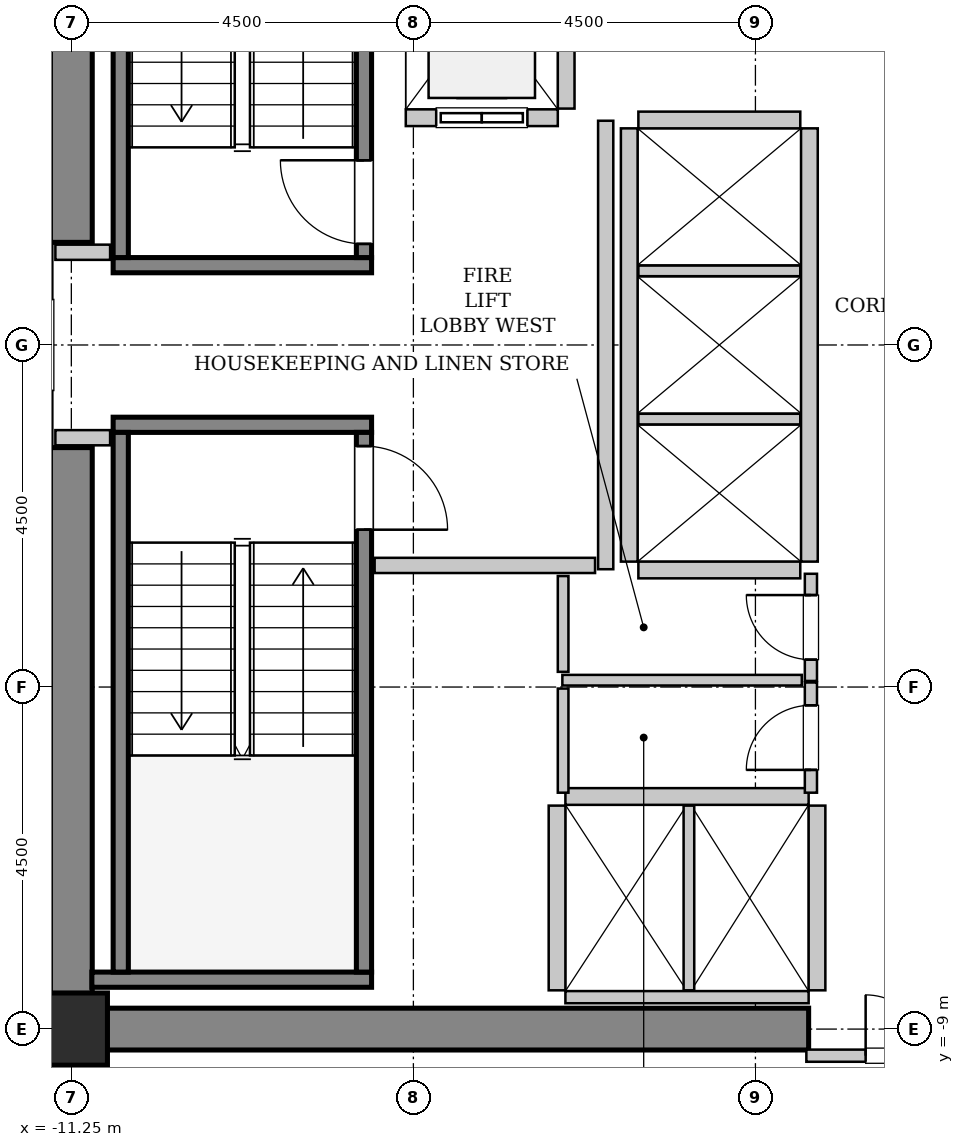
"""IFC4 building model, lengths in metres.
Left out: names, types, materials, properties, quantities, classifications, styles, units other than length and angle.
Written with IfcOpenShell. Run it as: python <this file> out.ifc"""

import sys

from ifc_helpers import new_model, si_unit, direction, frame, frame_2d, origin, origin_2d, place, context, subcontext, project, spatial, rectangle, hollow_rectangle, extrude, source, transform, mapped, element, fill, save


model = new_model("IFC4")
c1 = context("Model", 3, precision=1e-05, world=origin(), true_north=direction((0.0, 1.0)))
c2 = subcontext(c1, "Body", "Model", "MODEL_VIEW")
j1 = project(units=[si_unit("LENGTHUNIT", "METRE"), si_unit("PLANEANGLEUNIT", "RADIAN")], contexts=[c1])
p1 = place(None, origin())
s1 = spatial("IfcSite", under=j1, at=p1, CompositionType="ELEMENT")
p2 = place(p1, origin())
s2 = spatial("IfcBuilding", under=s1, at=p2, CompositionType="ELEMENT")
p3 = place(p2, frame((0.0, 0.0, 109.8)))
s3 = spatial("IfcBuildingStorey", under=s2, at=p3, CompositionType="ELEMENT", Elevation=109.8)
m1 = source(origin(), c2, "Body", "SweptSolid", [
    extrude(rectangle(XDim=9.975, YDim=0.55, at=frame_2d((4.987, 0.0))), origin(), (0.0, 0.0, 1.0), 3.8),
])
p4 = place(p3, frame((-11.525, -9.0, 0.0), z_axis=(0.0, 0.0, 1.0), x_axis=(1.0, 0.0, 0.0)))
e1 = element("IfcWall", 1, at=p4, inside=s3, PredefinedType="SHEAR", context=c2, shape_type="MappedRepresentation", body=[
    mapped(m1, transform((0.0, 0.0, 0.0), x_axis=(1.0, 0.0, 0.0), y_axis=(0.0, 1.0, 0.0), z_axis=(0.0, 0.0, 1.0), scale=1.0)),
])
m2 = source(origin(), c2, "Body", "SweptSolid", [
    extrude(rectangle(XDim=7.375, YDim=0.55, at=frame_2d((3.688, 0.0))), origin(), (0.0, 0.0, 1.0), 3.8),
])
for number, where, z_axis, x_axis in (
    (2, (-11.25, -8.725, 0.0), (0.0, 0.0, 1.0), (0.0, 1.0, 0.0)),
    (3, (-11.25, 1.35, 0.0), (0.0, 0.0, 1.0), (0.0, 1.0, 0.0)),
):
    element("IfcWall", number, at=place(p3, frame(where, z_axis=z_axis, x_axis=x_axis)), inside=s3, PredefinedType="SHEAR", context=c2, shape_type="MappedRepresentation", body=[
        mapped(m2, transform((0.0, 0.0, 0.0), x_axis=(1.0, 0.0, 0.0), y_axis=(0.0, 1.0, 0.0), z_axis=(0.0, 0.0, 1.0), scale=1.0)),
    ])
m3 = source(origin(), c2, "Body", "SweptSolid", [
    extrude(hollow_rectangle(XDim=0.95, YDim=0.95, WallThickness=0.045, InnerFilletRadius=0.045, OuterFilletRadius=0.09, at=origin_2d()), origin(), (0.0, 0.0, 1.0), 3.8),
])
p5 = place(p3, frame((-11.25, -9.0, 0.0), z_axis=(0.0, 0.0, 1.0), x_axis=(1.0, 0.0, 0.0)))
e4 = element("IfcColumn", 4, at=p5, inside=s3, PredefinedType="COLUMN", context=c2, shape_type="MappedRepresentation", body=[
    mapped(m3, transform((0.0, 0.0, 0.0), x_axis=(1.0, 0.0, 0.0), y_axis=(0.0, 1.0, 0.0), z_axis=(0.0, 0.0, 1.0), scale=1.0)),
])
m4 = source(origin(), c2, "Body", "SweptSolid", [
    extrude(rectangle(XDim=3.4, YDim=0.2, at=frame_2d((1.7, 0.0))), origin(), (0.0, 0.0, 1.0), 3.8),
])
p6 = place(p3, frame((-7.3, 1.05, 0.0), z_axis=(0.0, 0.0, 1.0), x_axis=(-1.0, 0.0, 0.0)))
e5 = element("IfcWall", 5, at=p6, inside=s3, PredefinedType="SOLIDWALL", context=c2, shape_type="MappedRepresentation", body=[
    mapped(m4, transform((0.0, 0.0, 0.0), x_axis=(1.0, 0.0, 0.0), y_axis=(0.0, 1.0, 0.0), z_axis=(0.0, 0.0, 1.0), scale=1.0)),
])
m5 = source(origin(), c2, "Body", "SweptSolid", [
    extrude(rectangle(XDim=7.1, YDim=0.2, at=frame_2d((3.55, 0.0))), origin(), (0.0, 0.0, 1.0), 3.8),
])
p7 = place(p3, frame((-7.4, 1.15, 0.0), z_axis=(0.0, 0.0, 1.0), x_axis=(0.0, 1.0, 0.0)))
e6 = element("IfcWall", 6, at=p7, inside=s3, PredefinedType="SOLIDWALL", context=c2, shape_type="MappedRepresentation", body=[
    mapped(m5, transform((0.0, 0.0, 0.0), x_axis=(1.0, 0.0, 0.0), y_axis=(0.0, 1.0, 0.0), z_axis=(0.0, 0.0, 1.0), scale=1.0)),
])
p8 = place(p7, frame((0.18, 0.0, 0.0)))
e7 = element("IfcOpeningElement", 7, at=p8, cuts=e6, PredefinedType="OPENING", context=c2, shape_type="SweptSolid", body=[
    extrude(rectangle(XDim=1.1, YDim=2.15, at=frame_2d((0.55, 1.075))), frame((0.0, 0.11, 0.0), z_axis=(0.0, -1.0, 0.0), x_axis=(1.0, 0.0, 0.0)), (0.0, 0.0, 1.0), 0.22),
])
p9 = place(p3, frame((-10.6, 1.15, 0.0), z_axis=(0.0, 0.0, 1.0), x_axis=(0.0, 1.0, 0.0)))
e8 = element("IfcWall", 8, at=p9, inside=s3, PredefinedType="SOLIDWALL", context=c2, shape_type="MappedRepresentation", body=[
    mapped(m5, transform((0.0, 0.0, 0.0), x_axis=(1.0, 0.0, 0.0), y_axis=(0.0, 1.0, 0.0), z_axis=(0.0, 0.0, 1.0), scale=1.0)),
])
p10 = place(p3, frame((-10.7, -1.05, 0.0), z_axis=(0.0, 0.0, 1.0), x_axis=(1.0, 0.0, 0.0)))
e9 = element("IfcWall", 9, at=p10, inside=s3, PredefinedType="SOLIDWALL", context=c2, shape_type="MappedRepresentation", body=[
    mapped(m4, transform((0.0, 0.0, 0.0), x_axis=(1.0, 0.0, 0.0), y_axis=(0.0, 1.0, 0.0), z_axis=(0.0, 0.0, 1.0), scale=1.0)),
])
m6 = source(origin(), c2, "Body", "SweptSolid", [
    extrude(rectangle(XDim=3.68, YDim=0.2, at=frame_2d((1.84, 0.0))), origin(), (0.0, 0.0, 1.0), 3.8),
])
p11 = place(p3, frame((-10.98, -8.35, 0.0), z_axis=(0.0, 0.0, 1.0), x_axis=(1.0, 0.0, 0.0)))
e10 = element("IfcWall", 10, at=p11, inside=s3, PredefinedType="SOLIDWALL", context=c2, shape_type="MappedRepresentation", body=[
    mapped(m6, transform((0.0, 0.0, 0.0), x_axis=(1.0, 0.0, 0.0), y_axis=(0.0, 1.0, 0.0), z_axis=(0.0, 0.0, 1.0), scale=1.0)),
])
p12 = place(p3, frame((-10.6, -1.15, 0.0), z_axis=(0.0, 0.0, 1.0), x_axis=(0.0, -1.0, 0.0)))
e11 = element("IfcWall", 11, at=p12, inside=s3, PredefinedType="SOLIDWALL", context=c2, shape_type="MappedRepresentation", body=[
    mapped(m5, transform((0.0, 0.0, 0.0), x_axis=(1.0, 0.0, 0.0), y_axis=(0.0, 1.0, 0.0), z_axis=(0.0, 0.0, 1.0), scale=1.0)),
])
p13 = place(p3, frame((-7.4, -1.15, 0.0), z_axis=(0.0, 0.0, 1.0), x_axis=(0.0, -1.0, 0.0)))
e12 = element("IfcWall", 12, at=p13, inside=s3, PredefinedType="SOLIDWALL", context=c2, shape_type="MappedRepresentation", body=[
    mapped(m5, transform((0.0, 0.0, 0.0), x_axis=(1.0, 0.0, 0.0), y_axis=(0.0, 1.0, 0.0), z_axis=(0.0, 0.0, 1.0), scale=1.0)),
])
p14 = place(p13, frame((0.18, 0.0, 0.0)))
e13 = element("IfcOpeningElement", 13, at=p14, cuts=e12, PredefinedType="OPENING", context=c2, shape_type="SweptSolid", body=[
    extrude(rectangle(XDim=1.1, YDim=2.15, at=frame_2d((0.55, 1.075))), frame((0.0, 0.11, 0.0), z_axis=(0.0, -1.0, 0.0), x_axis=(1.0, 0.0, 0.0)), (0.0, 0.0, 1.0), 0.22),
])
m7 = source(origin(), c2, "Body", "SweptSolid", [
    extrude(rectangle(XDim=2.0, YDim=0.22, at=frame_2d((1.0, 0.0))), origin(), (0.0, 0.0, 1.0), 3.535),
])
p15 = place(p3, frame((-6.85, 2.99, 0.0), z_axis=(0.0, 0.0, 1.0), x_axis=(1.0, 0.0, 0.0)))
e14 = element("IfcWall", 14, at=p15, inside=s3, PredefinedType="SOLIDWALL", context=c2, shape_type="MappedRepresentation", body=[
    mapped(m7, transform((0.0, 0.0, 0.0), x_axis=(1.0, 0.0, 0.0), y_axis=(0.0, 1.0, 0.0), z_axis=(0.0, 0.0, 1.0), scale=1.0)),
])
p16 = place(p15, frame((0.4, 0.0, 0.0)))
e15 = element("IfcOpeningElement", 15, at=p16, cuts=e14, PredefinedType="OPENING", context=c2, shape_type="SweptSolid", body=[
    extrude(rectangle(XDim=1.2, YDim=2.2, at=frame_2d((0.6, 1.1))), frame((0.0, 0.12, 0.0), z_axis=(0.0, -1.0, 0.0), x_axis=(1.0, 0.0, 0.0)), (0.0, 0.0, 1.0), 0.24),
])
m8 = source(origin(), c2, "Body", "SweptSolid", [
    extrude(rectangle(XDim=2.68, YDim=0.22, at=frame_2d((1.34, 0.0))), origin(), (0.0, 0.0, 1.0), 3.535),
])
p17 = place(p3, frame((-4.74, 3.11, 0.0), z_axis=(0.0, 0.0, 1.0), x_axis=(0.0, 1.0, 0.0)))
e16 = element("IfcWall", 16, at=p17, inside=s3, PredefinedType="SOLIDWALL", context=c2, shape_type="MappedRepresentation", body=[
    mapped(m8, transform((0.0, 0.0, 0.0), x_axis=(1.0, 0.0, 0.0), y_axis=(0.0, 1.0, 0.0), z_axis=(0.0, 0.0, 1.0), scale=1.0)),
])
m9 = source(origin(), c2, "Body", "SweptSolid", [
    extrude(rectangle(XDim=3.2, YDim=0.22, at=frame_2d((1.6, 0.0))), origin(), (0.0, 0.0, 1.0), 3.535),
])
p18 = place(p3, frame((-1.55, -5.94, 0.0), z_axis=(0.0, 0.0, 1.0), x_axis=(-1.0, 0.0, 0.0)))
e17 = element("IfcWall", 17, at=p18, inside=s3, PredefinedType="SOLIDWALL", context=c2, shape_type="MappedRepresentation", body=[
    mapped(m9, transform((0.0, 0.0, 0.0), x_axis=(1.0, 0.0, 0.0), y_axis=(0.0, 1.0, 0.0), z_axis=(0.0, 0.0, 1.0), scale=1.0)),
])
m10 = source(origin(), c2, "Body", "SweptSolid", [
    extrude(rectangle(XDim=3.2, YDim=0.16, at=frame_2d((1.6, 0.0))), origin(), (0.0, 0.0, 1.0), 2.425),
])
p19 = place(p3, frame((-4.75, -8.58, 0.0), z_axis=(0.0, 0.0, 1.0), x_axis=(1.0, 0.0, 0.0)))
e18 = element("IfcWall", 18, at=p19, inside=s3, PredefinedType="PARTITIONING", context=c2, shape_type="MappedRepresentation", body=[
    mapped(m10, transform((0.0, 0.0, 0.0), x_axis=(1.0, 0.0, 0.0), y_axis=(0.0, 1.0, 0.0), z_axis=(0.0, 0.0, 1.0), scale=1.0)),
])
m11 = source(origin(), c2, "Body", "SweptSolid", [
    extrude(rectangle(XDim=2.43, YDim=0.22, at=frame_2d((1.215, 0.0))), origin(), (0.0, 0.0, 1.0), 3.535),
])
p20 = place(p3, frame((-4.86, -6.06, 0.0), z_axis=(0.0, 0.0, 1.0), x_axis=(0.0, -1.0, 0.0)))
e19 = element("IfcWall", 19, at=p20, inside=s3, PredefinedType="SOLIDWALL", context=c2, shape_type="MappedRepresentation", body=[
    mapped(m11, transform((0.0, 0.0, 0.0), x_axis=(1.0, 0.0, 0.0), y_axis=(0.0, 1.0, 0.0), z_axis=(0.0, 0.0, 1.0), scale=1.0)),
])
m12 = source(origin(), c2, "Body", "SweptSolid", [
    extrude(rectangle(XDim=2.43, YDim=0.14, at=frame_2d((1.215, 0.0))), origin(), (0.0, 0.0, 1.0), 3.535),
])
p21 = place(p3, frame((-3.125, -8.49, 0.0), z_axis=(0.0, 0.0, 1.0), x_axis=(0.0, 1.0, 0.0)))
e20 = element("IfcWall", 20, at=p21, inside=s3, PredefinedType="PARTITIONING", context=c2, shape_type="MappedRepresentation", body=[
    mapped(m12, transform((0.0, 0.0, 0.0), x_axis=(1.0, 0.0, 0.0), y_axis=(0.0, 1.0, 0.0), z_axis=(0.0, 0.0, 1.0), scale=1.0)),
])
p22 = place(p3, frame((-1.44, -8.49, 0.0), z_axis=(0.0, 0.0, 1.0), x_axis=(0.0, 1.0, 0.0)))
e21 = element("IfcWall", 21, at=p22, inside=s3, PredefinedType="SOLIDWALL", context=c2, shape_type="MappedRepresentation", body=[
    mapped(m11, transform((0.0, 0.0, 0.0), x_axis=(1.0, 0.0, 0.0), y_axis=(0.0, 1.0, 0.0), z_axis=(0.0, 0.0, 1.0), scale=1.0)),
])
m13 = source(origin(), c2, "Body", "SweptSolid", [
    extrude(rectangle(XDim=5.7, YDim=0.22, at=frame_2d((2.85, 0.0))), origin(), (0.0, 0.0, 1.0), 3.535),
])
for number, where, z_axis, x_axis in (
    (22, (-1.54, -2.85, 0.0), (0.0, 0.0, 1.0), (0.0, 1.0, 0.0)),
    (23, (-3.91, 2.85, 0.0), (0.0, 0.0, 1.0), (0.0, -1.0, 0.0)),
):
    element("IfcWall", number, at=place(p3, frame(where, z_axis=z_axis, x_axis=x_axis)), inside=s3, PredefinedType="SOLIDWALL", context=c2, shape_type="MappedRepresentation", body=[
        mapped(m13, transform((0.0, 0.0, 0.0), x_axis=(1.0, 0.0, 0.0), y_axis=(0.0, 1.0, 0.0), z_axis=(0.0, 0.0, 1.0), scale=1.0)),
    ])
m14 = source(origin(), c2, "Body", "SweptSolid", [
    extrude(rectangle(XDim=2.13, YDim=0.22, at=frame_2d((1.065, 0.0))), origin(), (0.0, 0.0, 1.0), 3.535),
])
p23 = place(p3, frame((-3.79, -2.96, 0.0), z_axis=(0.0, 0.0, 1.0), x_axis=(1.0, 0.0, 0.0)))
e24 = element("IfcWall", 24, at=p23, inside=s3, PredefinedType="SOLIDWALL", context=c2, shape_type="MappedRepresentation", body=[
    mapped(m14, transform((0.0, 0.0, 0.0), x_axis=(1.0, 0.0, 0.0), y_axis=(0.0, 1.0, 0.0), z_axis=(0.0, 0.0, 1.0), scale=1.0)),
])
m15 = source(origin(), c2, "Body", "SweptSolid", [
    extrude(rectangle(XDim=2.13, YDim=0.14, at=frame_2d((1.065, 0.0))), origin(), (0.0, 0.0, 1.0), 3.535),
])
for number, where, z_axis, x_axis in (
    (25, (-3.79, -0.975, 0.0), (0.0, 0.0, 1.0), (1.0, 0.0, 0.0)),
    (26, (-3.79, 0.975, 0.0), (0.0, 0.0, 1.0), (1.0, 0.0, 0.0)),
):
    element("IfcWall", number, at=place(p3, frame(where, z_axis=z_axis, x_axis=x_axis)), inside=s3, PredefinedType="PARTITIONING", context=c2, shape_type="MappedRepresentation", body=[
        mapped(m15, transform((0.0, 0.0, 0.0), x_axis=(1.0, 0.0, 0.0), y_axis=(0.0, 1.0, 0.0), z_axis=(0.0, 0.0, 1.0), scale=1.0)),
    ])
p24 = place(p3, frame((-1.66, 2.96, 0.0), z_axis=(0.0, 0.0, 1.0), x_axis=(-1.0, 0.0, 0.0)))
e27 = element("IfcWall", 27, at=p24, inside=s3, PredefinedType="SOLIDWALL", context=c2, shape_type="MappedRepresentation", body=[
    mapped(m14, transform((0.0, 0.0, 0.0), x_axis=(1.0, 0.0, 0.0), y_axis=(0.0, 1.0, 0.0), z_axis=(0.0, 0.0, 1.0), scale=1.0)),
])
m16 = source(origin(), c2, "Body", "SweptSolid", [
    extrude(rectangle(XDim=5.9, YDim=0.2, at=frame_2d((2.95, 0.0))), origin(), (0.0, 0.0, 1.0), 3.535),
])
p25 = place(p3, frame((-4.22, -2.95, 0.0), z_axis=(0.0, 0.0, 1.0), x_axis=(0.0, 1.0, 0.0)))
e28 = element("IfcWall", 28, at=p25, inside=s3, PredefinedType="PARTITIONING", context=c2, shape_type="MappedRepresentation", body=[
    mapped(m16, transform((0.0, 0.0, 0.0), x_axis=(1.0, 0.0, 0.0), y_axis=(0.0, 1.0, 0.0), z_axis=(0.0, 0.0, 1.0), scale=1.0)),
])
m17 = source(origin(), c2, "Body", "SweptSolid", [
    extrude(rectangle(XDim=2.9, YDim=0.2, at=frame_2d((1.45, 0.0))), origin(), (0.0, 0.0, 1.0), 3.535),
])
p26 = place(p3, frame((-7.26, -2.9, 0.0), z_axis=(0.0, 0.0, 1.0), x_axis=(1.0, 0.0, 0.0)))
e29 = element("IfcWall", 29, at=p26, inside=s3, PredefinedType="PARTITIONING", context=c2, shape_type="MappedRepresentation", body=[
    mapped(m17, transform((0.0, 0.0, 0.0), x_axis=(1.0, 0.0, 0.0), y_axis=(0.0, 1.0, 0.0), z_axis=(0.0, 0.0, 1.0), scale=1.0)),
])
m18 = source(origin(), c2, "Body", "SweptSolid", [
    extrude(rectangle(XDim=0.72, YDim=0.2, at=frame_2d((0.36, 0.0))), origin(), (0.0, 0.0, 1.0), 3.535),
])
for number, where, z_axis, x_axis in (
    (30, (-11.46, 1.22, 0.0), (0.0, 0.0, 1.0), (1.0, 0.0, 0.0)),
    (31, (-11.46, -1.22, 0.0), (0.0, 0.0, 1.0), (1.0, 0.0, 0.0)),
):
    element("IfcWall", number, at=place(p3, frame(where, z_axis=z_axis, x_axis=x_axis)), inside=s3, PredefinedType="PARTITIONING", context=c2, shape_type="MappedRepresentation", body=[
        mapped(m18, transform((0.0, 0.0, 0.0), x_axis=(1.0, 0.0, 0.0), y_axis=(0.0, 1.0, 0.0), z_axis=(0.0, 0.0, 1.0), scale=1.0)),
    ])
m19 = source(origin(), c2, "Body", "SweptSolid", [
    extrude(rectangle(XDim=3.16, YDim=0.16, at=frame_2d((1.58, 0.0))), origin(), (0.0, 0.0, 1.0), 2.425),
])
p27 = place(p3, frame((-1.58, -9.35, 0.0), z_axis=(0.0, 0.0, 1.0), x_axis=(1.0, 0.0, 0.0)))
e32 = element("IfcWall", 32, at=p27, inside=s3, PredefinedType="PARTITIONING", context=c2, shape_type="MappedRepresentation", body=[
    mapped(m19, transform((0.0, 0.0, 0.0), x_axis=(1.0, 0.0, 0.0), y_axis=(0.0, 1.0, 0.0), z_axis=(0.0, 0.0, 1.0), scale=1.0)),
])
p28 = place(p27, frame((0.78, 0.0, 0.0)))
e33 = element("IfcOpeningElement", 33, at=p28, cuts=e32, PredefinedType="OPENING", context=c2, shape_type="SweptSolid", body=[
    extrude(rectangle(XDim=1.6, YDim=2.3, at=frame_2d((0.8, 1.15))), frame((0.0, 0.09, 0.0), z_axis=(0.0, -1.0, 0.0), x_axis=(1.0, 0.0, 0.0)), (0.0, 0.0, 1.0), 0.18),
])
m20 = source(origin(), c2, "Body", "SweptSolid", [
    extrude(rectangle(XDim=1.41, YDim=0.16, at=frame_2d((0.705, 0.0))), origin(), (0.0, 0.0, 1.0), 3.535),
])
p29 = place(p3, frame((-1.52, -4.42, 0.0), z_axis=(0.0, 0.0, 1.0), x_axis=(0.0, 1.0, 0.0)))
e34 = element("IfcWall", 34, at=p29, inside=s3, PredefinedType="PARTITIONING", context=c2, shape_type="MappedRepresentation", body=[
    mapped(m20, transform((0.0, 0.0, 0.0), x_axis=(1.0, 0.0, 0.0), y_axis=(0.0, 1.0, 0.0), z_axis=(0.0, 0.0, 1.0), scale=1.0)),
])
p30 = place(p29, frame((0.28, 0.0, 0.0)))
e35 = element("IfcOpeningElement", 35, at=p30, cuts=e34, PredefinedType="OPENING", context=c2, shape_type="SweptSolid", body=[
    extrude(rectangle(XDim=0.85, YDim=2.1, at=frame_2d((0.425, 1.05))), frame((0.0, 0.09, 0.0), z_axis=(0.0, -1.0, 0.0), x_axis=(1.0, 0.0, 0.0)), (0.0, 0.0, 1.0), 0.18),
])
m21 = source(origin(), c2, "Body", "SweptSolid", [
    extrude(rectangle(XDim=3.15, YDim=0.14, at=frame_2d((1.575, 0.0))), origin(), (0.0, 0.0, 1.0), 3.535),
])
p31 = place(p3, frame((-4.79, -4.41, 0.0), z_axis=(0.0, 0.0, 1.0), x_axis=(1.0, 0.0, 0.0)))
e36 = element("IfcWall", 36, at=p31, inside=s3, PredefinedType="PARTITIONING", context=c2, shape_type="MappedRepresentation", body=[
    mapped(m21, transform((0.0, 0.0, 0.0), x_axis=(1.0, 0.0, 0.0), y_axis=(0.0, 1.0, 0.0), z_axis=(0.0, 0.0, 1.0), scale=1.0)),
])
m22 = source(origin(), c2, "Body", "SweptSolid", [
    extrude(rectangle(XDim=1.26, YDim=0.14, at=frame_2d((0.63, 0.0))), origin(), (0.0, 0.0, 1.0), 3.535),
])
p32 = place(p3, frame((-4.78, -4.3, 0.0), z_axis=(0.0, 0.0, 1.0), x_axis=(0.0, 1.0, 0.0)))
e37 = element("IfcWall", 37, at=p32, inside=s3, PredefinedType="PARTITIONING", context=c2, shape_type="MappedRepresentation", body=[
    mapped(m22, transform((0.0, 0.0, 0.0), x_axis=(1.0, 0.0, 0.0), y_axis=(0.0, 1.0, 0.0), z_axis=(0.0, 0.0, 1.0), scale=1.0)),
])
m23 = source(origin(), c2, "Body", "SweptSolid", [
    extrude(rectangle(XDim=1.45, YDim=0.16, at=frame_2d((0.725, 0.0))), origin(), (0.0, 0.0, 1.0), 3.535),
])
p33 = place(p3, frame((-1.52, -5.89, 0.0), z_axis=(0.0, 0.0, 1.0), x_axis=(0.0, 1.0, 0.0)))
e38 = element("IfcWall", 38, at=p33, inside=s3, PredefinedType="PARTITIONING", context=c2, shape_type="MappedRepresentation", body=[
    mapped(m23, transform((0.0, 0.0, 0.0), x_axis=(1.0, 0.0, 0.0), y_axis=(0.0, 1.0, 0.0), z_axis=(0.0, 0.0, 1.0), scale=1.0)),
])
p34 = place(p33, frame((0.3, 0.0, 0.0)))
e39 = element("IfcOpeningElement", 39, at=p34, cuts=e38, PredefinedType="OPENING", context=c2, shape_type="SweptSolid", body=[
    extrude(rectangle(XDim=0.85, YDim=2.1, at=frame_2d((0.425, 1.05))), frame((0.0, 0.09, 0.0), z_axis=(0.0, -1.0, 0.0), x_axis=(1.0, 0.0, 0.0)), (0.0, 0.0, 1.0), 0.18),
])
m24 = source(origin(), c2, "Body", "SweptSolid", [
    extrude(rectangle(XDim=1.37, YDim=0.14, at=frame_2d((0.685, 0.0))), origin(), (0.0, 0.0, 1.0), 3.535),
])
p35 = place(p3, frame((-4.78, -5.89, 0.0), z_axis=(0.0, 0.0, 1.0), x_axis=(0.0, 1.0, 0.0)))
e40 = element("IfcWall", 40, at=p35, inside=s3, PredefinedType="PARTITIONING", context=c2, shape_type="MappedRepresentation", body=[
    mapped(m24, transform((0.0, 0.0, 0.0), x_axis=(1.0, 0.0, 0.0), y_axis=(0.0, 1.0, 0.0), z_axis=(0.0, 0.0, 1.0), scale=1.0)),
])
m25 = source(origin(), c2, "Body", "SweptSolid", [
    extrude(rectangle(XDim=1.1, YDim=2.15, at=frame_2d((0.55, 1.075))), frame((0.0, 0.025, 0.0), z_axis=(0.0, -1.0, 0.0), x_axis=(1.0, 0.0, 0.0)), (0.0, 0.0, 1.0), 0.05),
])
p36 = place(p8, origin())
e41 = element("IfcDoor", 41, at=p36, inside=s3, OperationType="SINGLE_SWING_RIGHT", PredefinedType="DOOR", context=c2, shape_type="MappedRepresentation", body=[
    mapped(m25, transform((0.0, 0.0, 0.0), x_axis=(1.0, 0.0, 0.0), y_axis=(0.0, 1.0, 0.0), z_axis=(0.0, 0.0, 1.0), scale=1.0)),
])
fill(e7, e41)
p37 = place(p14, origin())
e42 = element("IfcDoor", 42, at=p37, inside=s3, OperationType="SINGLE_SWING_RIGHT", PredefinedType="DOOR", context=c2, shape_type="MappedRepresentation", body=[
    mapped(m25, transform((0.0, 0.0, 0.0), x_axis=(1.0, 0.0, 0.0), y_axis=(0.0, 1.0, 0.0), z_axis=(0.0, 0.0, 1.0), scale=1.0)),
])
fill(e13, e42)
m26 = source(origin(), c2, "Body", "SweptSolid", [
    extrude(rectangle(XDim=1.2, YDim=2.2, at=frame_2d((0.6, 1.1))), frame((0.0, 0.025, 0.0), z_axis=(0.0, -1.0, 0.0), x_axis=(1.0, 0.0, 0.0)), (0.0, 0.0, 1.0), 0.05),
])
p38 = place(p16, origin())
e43 = element("IfcDoor", 43, at=p38, inside=s3, OperationType="SLIDING_TO_LEFT", PredefinedType="DOOR", context=c2, shape_type="MappedRepresentation", body=[
    mapped(m26, transform((0.0, 0.0, 0.0), x_axis=(1.0, 0.0, 0.0), y_axis=(0.0, 1.0, 0.0), z_axis=(0.0, 0.0, 1.0), scale=1.0)),
])
fill(e15, e43)
m27 = source(origin(), c2, "Body", "SweptSolid", [
    extrude(rectangle(XDim=1.6, YDim=2.3, at=frame_2d((0.8, 1.15))), frame((0.0, 0.025, 0.0), z_axis=(0.0, -1.0, 0.0), x_axis=(1.0, 0.0, 0.0)), (0.0, 0.0, 1.0), 0.05),
])
p39 = place(p28, origin())
e44 = element("IfcDoor", 44, at=p39, inside=s3, OperationType="DOUBLE_DOOR_SINGLE_SWING", PredefinedType="DOOR", context=c2, shape_type="MappedRepresentation", body=[
    mapped(m27, transform((0.0, 0.0, 0.0), x_axis=(1.0, 0.0, 0.0), y_axis=(0.0, 1.0, 0.0), z_axis=(0.0, 0.0, 1.0), scale=1.0)),
])
fill(e33, e44)
m28 = source(origin(), c2, "Body", "SweptSolid", [
    extrude(rectangle(XDim=0.85, YDim=2.1, at=frame_2d((0.425, 1.05))), frame((0.0, 0.025, 0.0), z_axis=(0.0, -1.0, 0.0), x_axis=(1.0, 0.0, 0.0)), (0.0, 0.0, 1.0), 0.05),
])
p40 = place(p30, origin())
e45 = element("IfcDoor", 45, at=p40, inside=s3, OperationType="SINGLE_SWING_RIGHT", PredefinedType="DOOR", context=c2, shape_type="MappedRepresentation", body=[
    mapped(m28, transform((0.0, 0.0, 0.0), x_axis=(1.0, 0.0, 0.0), y_axis=(0.0, 1.0, 0.0), z_axis=(0.0, 0.0, 1.0), scale=1.0)),
])
fill(e35, e45)
p41 = place(p34, origin())
e46 = element("IfcDoor", 46, at=p41, inside=s3, OperationType="SINGLE_SWING_LEFT", PredefinedType="DOOR", context=c2, shape_type="MappedRepresentation", body=[
    mapped(m28, transform((0.0, 0.0, 0.0), x_axis=(1.0, 0.0, 0.0), y_axis=(0.0, 1.0, 0.0), z_axis=(0.0, 0.0, 1.0), scale=1.0)),
])
fill(e39, e46)
save(model, sys.argv[1])
